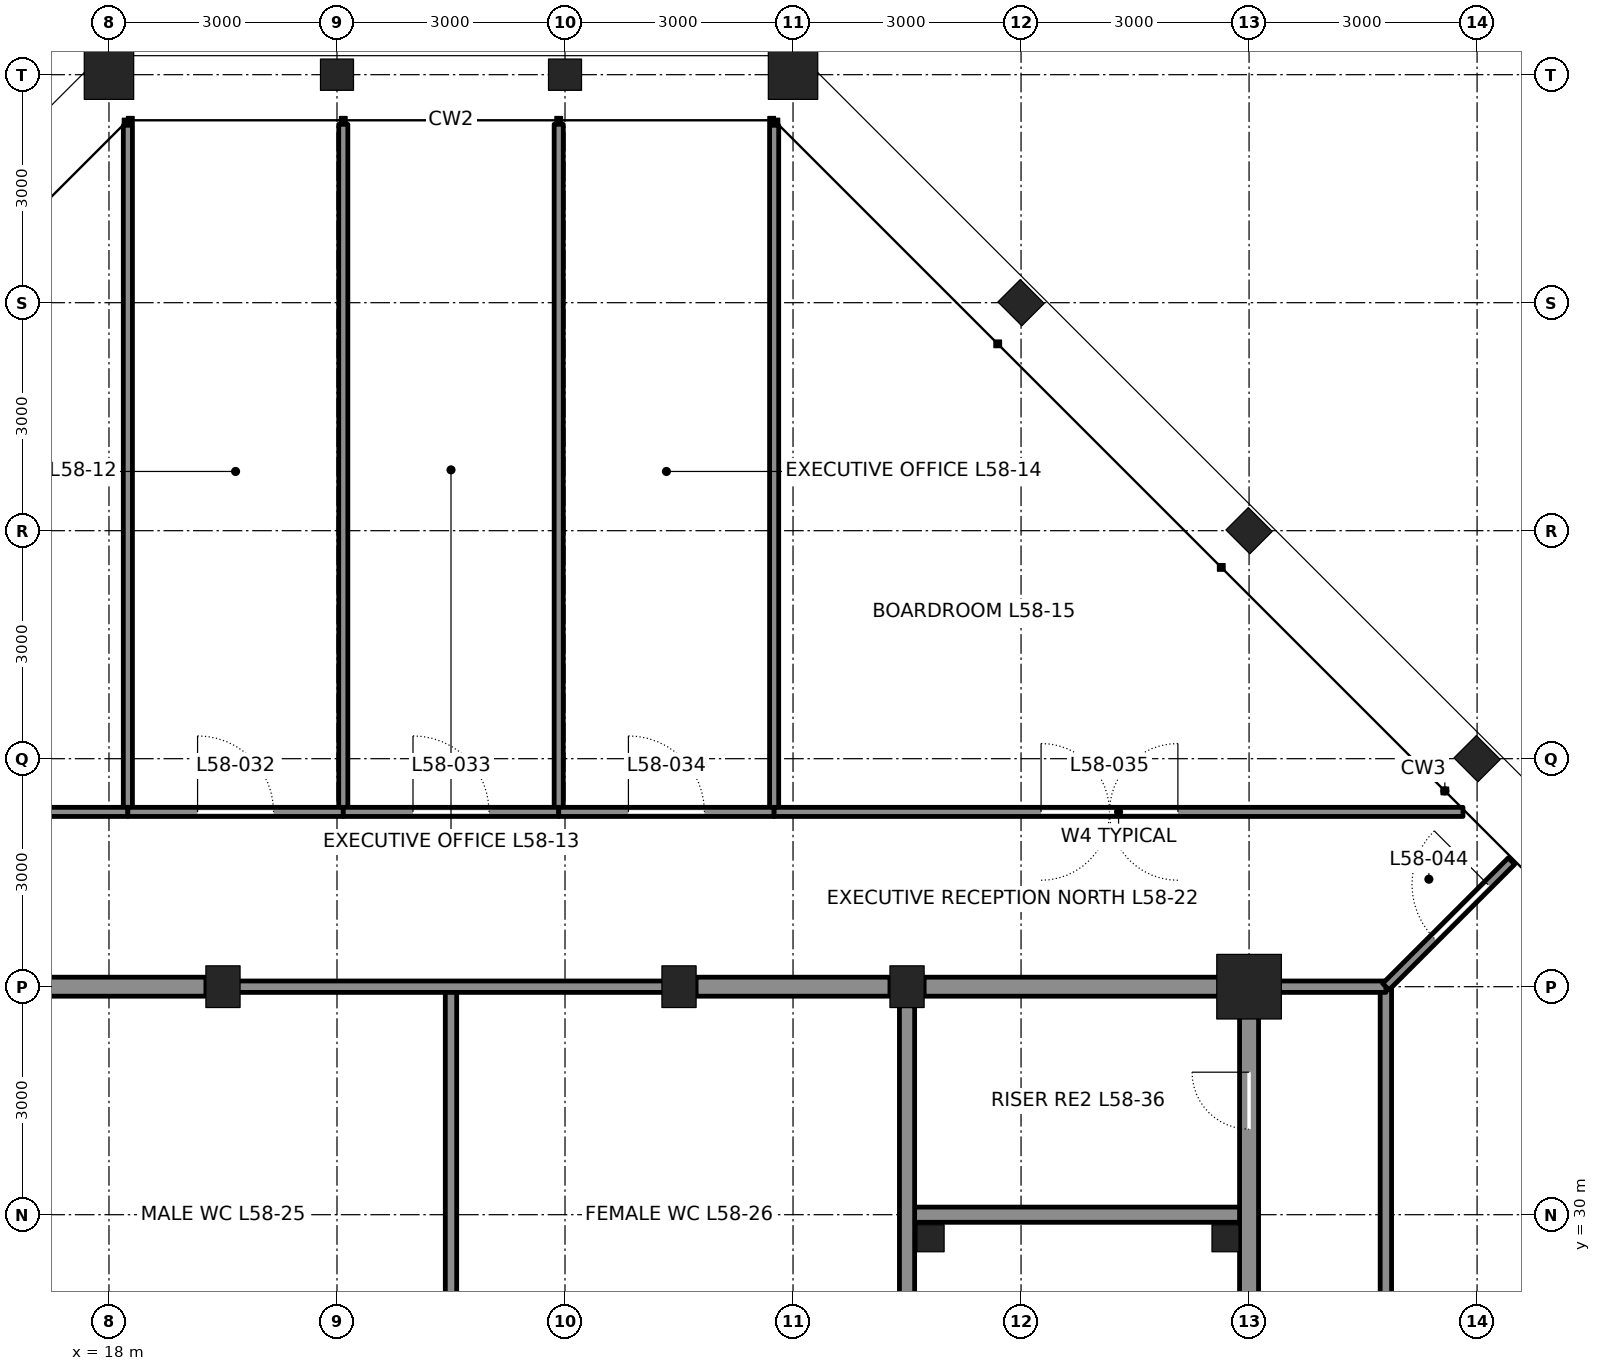
"""IFC4 building model, lengths in metres.
Left out: names, types, materials, properties, quantities, classifications, styles, units other than length and angle.
Written with IfcOpenShell. Run it as: python <this file> out.ifc"""

import sys

from ifc_helpers import new_model, si_unit, direction, frame, frame_2d, origin, origin_2d, place, context, subcontext, project, spatial, rectangle, hollow_rectangle, i_section, extrude, element, fill, save


model = new_model("IFC4")
c1 = context("Model", 3, precision=1e-05, world=origin(), true_north=direction((0.0, 1.0)))
c2 = subcontext(c1, "Body", "Model", "MODEL_VIEW")
j1 = project(units=[si_unit("LENGTHUNIT", "METRE"), si_unit("PLANEANGLEUNIT", "RADIAN")], contexts=[c1])
p1 = place(None, origin())
s1 = spatial("IfcSite", under=j1, at=p1, CompositionType="ELEMENT")
p2 = place(p1, origin())
s2 = spatial("IfcBuilding", under=s1, at=p2, CompositionType="ELEMENT")
p3 = place(p2, frame((0.0, 0.0, 262.2)))
s3 = spatial("IfcBuildingStorey", under=s2, at=p3, CompositionType="ELEMENT", Elevation=262.2)
for number, where, z_axis, x_axis in (
    (1, (36.0, 36.0, 0.0), (0.0, 0.0, 1.0), (0.707, 0.707, 0.0)),
    (2, (33.0, 39.0, 0.0), (0.0, 0.0, 1.0), (0.707, 0.707, 0.0)),
    (3, (30.0, 42.0, 0.0), (0.0, 0.0, 1.0), (0.707, 0.707, 0.0)),
):
    element("IfcColumn", number, at=place(p3, frame(where, z_axis=z_axis, x_axis=x_axis)), inside=s3, PredefinedType="COLUMN", context=c2, shape_type="SweptSolid", body=[
        extrude(i_section(OverallWidth=0.417, OverallDepth=0.445, WebThickness=0.039, FlangeThickness=0.063, at=origin_2d()), origin(), (0.0, 0.0, 1.0), 4.2),
    ])
p4 = place(p3, frame((27.0, 45.0, 0.0), z_axis=(0.0, 0.0, 1.0), x_axis=(0.0, 1.0, 0.0)))
e4 = element("IfcColumn", 4, at=p4, inside=s3, PredefinedType="COLUMN", context=c2, shape_type="SweptSolid", body=[
    extrude(hollow_rectangle(XDim=0.65, YDim=0.65, WallThickness=0.065, at=origin_2d()), origin(), (0.0, 0.0, 1.0), 4.2),
])
for number, where, z_axis, x_axis in (
    (5, (24.0, 45.0, 0.0), (0.0, 0.0, 1.0), (0.0, 1.0, 0.0)),
    (6, (21.0, 45.0, 0.0), (0.0, 0.0, 1.0), (0.0, 1.0, 0.0)),
):
    element("IfcColumn", number, at=place(p3, frame(where, z_axis=z_axis, x_axis=x_axis)), inside=s3, PredefinedType="COLUMN", context=c2, shape_type="SweptSolid", body=[
        extrude(i_section(OverallWidth=0.411, OverallDepth=0.434, WebThickness=0.036, FlangeThickness=0.057, at=origin_2d()), origin(), (0.0, 0.0, 1.0), 4.2),
    ])
p5 = place(p3, frame((18.0, 45.0, 0.0), z_axis=(0.0, 0.0, 1.0), x_axis=(0.0, 1.0, 0.0)))
e7 = element("IfcColumn", 7, at=p5, inside=s3, PredefinedType="COLUMN", context=c2, shape_type="SweptSolid", body=[
    extrude(hollow_rectangle(XDim=0.65, YDim=0.65, WallThickness=0.065, at=origin_2d()), origin(), (0.0, 0.0, 1.0), 4.2),
])
for number, where, z_axis, x_axis in (
    (8, (19.5, 33.0, 0.0), (0.0, 0.0, 1.0), (1.0, 0.0, 0.0)),
    (9, (25.5, 33.0, 0.0), (0.0, 0.0, 1.0), (1.0, 0.0, 0.0)),
    (10, (28.5, 33.0, 0.0), (0.0, 0.0, 1.0), (1.0, 0.0, 0.0)),
):
    element("IfcColumn", number, at=place(p3, frame(where, z_axis=z_axis, x_axis=x_axis)), inside=s3, PredefinedType="COLUMN", context=c2, shape_type="SweptSolid", body=[
        extrude(i_section(OverallWidth=0.449, OverallDepth=0.549, WebThickness=0.072, FlangeThickness=0.115, at=origin_2d()), origin(), (0.0, 0.0, 1.0), 4.2),
    ])
p6 = place(p3, frame((33.0, 33.0, 0.0), z_axis=(0.0, 0.0, 1.0), x_axis=(1.0, 0.0, 0.0)))
e11 = element("IfcColumn", 11, at=p6, inside=s3, PredefinedType="COLUMN", context=c2, shape_type="SweptSolid", body=[
    extrude(hollow_rectangle(XDim=0.85, YDim=0.85, WallThickness=0.085, at=origin_2d()), origin(), (0.0, 0.0, 1.0), 4.2),
])
p7 = place(p3, frame((28.5, 30.0, 0.0), z_axis=(0.0, 0.0, 1.0), x_axis=(1.0, 0.0, 0.0)))
e12 = element("IfcWall", 12, at=p7, inside=s3, PredefinedType="SOLIDWALL", context=c2, shape_type="SweptSolid", body=[
    extrude(rectangle(XDim=4.5, YDim=0.2, at=frame_2d((2.25, 0.0))), origin(), (0.0, 0.0, 1.0), 4.04),
])
for number, where, z_axis, x_axis in (
    (13, (16.725, 33.0, 0.0), (0.0, 0.0, 1.0), (1.0, 0.0, 0.0)),
    (14, (25.725, 33.0, 0.0), (0.0, 0.0, 1.0), (1.0, 0.0, 0.0)),
):
    element("IfcWall", number, at=place(p3, frame(where, z_axis=z_axis, x_axis=x_axis)), inside=s3, PredefinedType="SOLIDWALL", context=c2, shape_type="SweptSolid", body=[
        extrude(rectangle(XDim=2.55, YDim=0.25, at=frame_2d((1.275, 0.0))), origin(), (0.0, 0.0, 1.0), 3.182),
    ])
p8 = place(p3, frame((28.725, 33.0, 0.0), z_axis=(0.0, 0.0, 1.0), x_axis=(1.0, 0.0, 0.0)))
e15 = element("IfcWall", 15, at=p8, inside=s3, PredefinedType="SOLIDWALL", context=c2, shape_type="SweptSolid", body=[
    extrude(rectangle(XDim=4.025, YDim=0.25, at=frame_2d((2.013, 0.0))), origin(), (0.0, 0.0, 1.0), 3.182),
])
p9 = place(p3, frame((28.5, 24.25, 0.0), z_axis=(0.0, 0.0, 1.0), x_axis=(0.0, 1.0, 0.0)))
e16 = element("IfcWall", 16, at=p9, inside=s3, PredefinedType="SOLIDWALL", context=c2, shape_type="SweptSolid", body=[
    extrude(rectangle(XDim=8.5, YDim=0.2, at=frame_2d((4.25, 0.0))), origin(), (0.0, 0.0, 1.0), 3.113),
])
p10 = place(p3, frame((33.0, 24.25, 0.0), z_axis=(0.0, 0.0, 1.0), x_axis=(0.0, 1.0, 0.0)))
e17 = element("IfcWall", 17, at=p10, inside=s3, PredefinedType="SOLIDWALL", context=c2, shape_type="SweptSolid", body=[
    extrude(rectangle(XDim=8.5, YDim=0.25, at=frame_2d((4.25, 0.0))), origin(), (0.0, 0.0, 1.0), 3.113),
])
p11 = place(p10, frame((6.875, 0.0, 0.0)))
e18 = element("IfcOpeningElement", 18, at=p11, cuts=e17, PredefinedType="OPENING", context=c2, shape_type="SweptSolid", body=[
    extrude(rectangle(XDim=0.75, YDim=2.1, at=frame_2d((0.375, 1.05))), frame((0.0, 0.135, 0.0), z_axis=(0.0, -1.0, 0.0), x_axis=(1.0, 0.0, 0.0)), (0.0, 0.0, 1.0), 0.27),
])
p12 = place(p3, frame((22.5, 27.0, 0.0), z_axis=(0.0, 0.0, 1.0), x_axis=(0.0, 1.0, 0.0)))
e19 = element("IfcWall", 19, at=p12, inside=s3, PredefinedType="PARTITIONING", context=c2, shape_type="SweptSolid", body=[
    extrude(rectangle(XDim=6.0, YDim=0.15, at=frame_2d((3.0, 0.0))), origin(), (0.0, 0.0, 1.0), 4.04),
])
p13 = place(p3, frame((19.5, 33.0, 0.0), z_axis=(0.0, 0.0, 1.0), x_axis=(1.0, 0.0, 0.0)))
e20 = element("IfcWall", 20, at=p13, inside=s3, PredefinedType="PARTITIONING", context=c2, shape_type="SweptSolid", body=[
    extrude(rectangle(XDim=6.0, YDim=0.15, at=frame_2d((3.0, 0.0))), origin(), (0.0, 0.0, 1.0), 3.182),
])
p14 = place(p3, frame((18.249, 44.334, 0.0), z_axis=(0.0, 0.0, 1.0), x_axis=(0.0, -1.0, 0.0)))
e21 = element("IfcWall", 21, at=p14, inside=s3, PredefinedType="PARTITIONING", context=c2, shape_type="SweptSolid", body=[
    extrude(rectangle(XDim=9.034, YDim=0.12, at=frame_2d((4.517, 0.0))), origin(), (0.0, 0.0, 1.0), 4.04),
])
for number, where, z_axis, x_axis in (
    (22, (21.083, 44.347, 0.0), (0.0, 0.0, 1.0), (0.0, -1.0, 0.0)),
    (23, (23.917, 44.347, 0.0), (0.0, 0.0, 1.0), (0.0, -1.0, 0.0)),
):
    element("IfcWall", number, at=place(p3, frame(where, z_axis=z_axis, x_axis=x_axis)), inside=s3, PredefinedType="PARTITIONING", context=c2, shape_type="SweptSolid", body=[
        extrude(rectangle(XDim=9.047, YDim=0.12, at=frame_2d((4.524, 0.0))), origin(), (0.0, 0.0, 1.0), 3.357),
    ])
p15 = place(p3, frame((26.751, 44.334, 0.0), z_axis=(0.0, 0.0, 1.0), x_axis=(0.0, -1.0, 0.0)))
e24 = element("IfcWall", 24, at=p15, inside=s3, PredefinedType="PARTITIONING", context=c2, shape_type="SweptSolid", body=[
    extrude(rectangle(XDim=9.034, YDim=0.12, at=frame_2d((4.517, 0.0))), origin(), (0.0, 0.0, 1.0), 4.04),
])
p16 = place(p3, frame((9.186, 35.3, 0.0), z_axis=(0.0, 0.0, 1.0), x_axis=(1.0, 0.0, 0.0)))
e25 = element("IfcWall", 25, at=p16, inside=s3, PredefinedType="PARTITIONING", context=c2, shape_type="SweptSolid", body=[
    extrude(rectangle(XDim=9.063, YDim=0.12, at=frame_2d((4.531, 0.0))), origin(), (0.0, 0.0, 1.0), 4.04),
])
p17 = place(p16, frame((3.512, 0.0, 0.0)))
e26 = element("IfcOpeningElement", 26, at=p17, cuts=e25, PredefinedType="OPENING", context=c2, shape_type="SweptSolid", body=[
    extrude(rectangle(XDim=1.8, YDim=2.4, at=frame_2d((0.9, 1.2))), frame((0.0, 0.07, 0.0), z_axis=(0.0, -1.0, 0.0), x_axis=(1.0, 0.0, 0.0)), (0.0, 0.0, 1.0), 0.14),
])
p18 = place(p3, frame((18.249, 35.3, 0.0), z_axis=(0.0, 0.0, 1.0), x_axis=(1.0, 0.0, 0.0)))
e27 = element("IfcWall", 27, at=p18, inside=s3, PredefinedType="PARTITIONING", context=c2, shape_type="SweptSolid", body=[
    extrude(rectangle(XDim=2.834, YDim=0.12, at=frame_2d((1.417, 0.0))), origin(), (0.0, 0.0, 1.0), 4.04),
])
p19 = place(p18, frame((0.917, 0.0, 0.0)))
e28 = element("IfcOpeningElement", 28, at=p19, cuts=e27, PredefinedType="OPENING", context=c2, shape_type="SweptSolid", body=[
    extrude(rectangle(XDim=1.0, YDim=2.4, at=frame_2d((0.5, 1.2))), frame((0.0, 0.07, 0.0), z_axis=(0.0, -1.0, 0.0), x_axis=(1.0, 0.0, 0.0)), (0.0, 0.0, 1.0), 0.14),
])
p20 = place(p3, frame((21.083, 35.3, 0.0), z_axis=(0.0, 0.0, 1.0), x_axis=(1.0, 0.0, 0.0)))
e29 = element("IfcWall", 29, at=p20, inside=s3, PredefinedType="PARTITIONING", context=c2, shape_type="SweptSolid", body=[
    extrude(rectangle(XDim=2.834, YDim=0.12, at=frame_2d((1.417, 0.0))), origin(), (0.0, 0.0, 1.0), 4.04),
])
p21 = place(p20, frame((0.917, 0.0, 0.0)))
e30 = element("IfcOpeningElement", 30, at=p21, cuts=e29, PredefinedType="OPENING", context=c2, shape_type="SweptSolid", body=[
    extrude(rectangle(XDim=1.0, YDim=2.4, at=frame_2d((0.5, 1.2))), frame((0.0, 0.07, 0.0), z_axis=(0.0, -1.0, 0.0), x_axis=(1.0, 0.0, 0.0)), (0.0, 0.0, 1.0), 0.14),
])
p22 = place(p3, frame((23.917, 35.3, 0.0), z_axis=(0.0, 0.0, 1.0), x_axis=(1.0, 0.0, 0.0)))
e31 = element("IfcWall", 31, at=p22, inside=s3, PredefinedType="PARTITIONING", context=c2, shape_type="SweptSolid", body=[
    extrude(rectangle(XDim=2.834, YDim=0.12, at=frame_2d((1.417, 0.0))), origin(), (0.0, 0.0, 1.0), 4.04),
])
p23 = place(p22, frame((0.917, 0.0, 0.0)))
e32 = element("IfcOpeningElement", 32, at=p23, cuts=e31, PredefinedType="OPENING", context=c2, shape_type="SweptSolid", body=[
    extrude(rectangle(XDim=1.0, YDim=2.4, at=frame_2d((0.5, 1.2))), frame((0.0, 0.07, 0.0), z_axis=(0.0, -1.0, 0.0), x_axis=(1.0, 0.0, 0.0)), (0.0, 0.0, 1.0), 0.14),
])
p24 = place(p3, frame((26.751, 35.3, 0.0), z_axis=(0.0, 0.0, 1.0), x_axis=(1.0, 0.0, 0.0)))
e33 = element("IfcWall", 33, at=p24, inside=s3, PredefinedType="PARTITIONING", context=c2, shape_type="SweptSolid", body=[
    extrude(rectangle(XDim=9.063, YDim=0.12, at=frame_2d((4.531, 0.0))), origin(), (0.0, 0.0, 1.0), 4.04),
])
p25 = place(p24, frame((3.512, 0.0, 0.0)))
e34 = element("IfcOpeningElement", 34, at=p25, cuts=e33, PredefinedType="OPENING", context=c2, shape_type="SweptSolid", body=[
    extrude(rectangle(XDim=1.8, YDim=2.4, at=frame_2d((0.9, 1.2))), frame((0.0, 0.07, 0.0), z_axis=(0.0, -1.0, 0.0), x_axis=(1.0, 0.0, 0.0)), (0.0, 0.0, 1.0), 0.14),
])
p26 = place(p3, frame((34.8, 8.686, 0.0), z_axis=(0.0, 0.0, 1.0), x_axis=(0.0, 1.0, 0.0)))
e35 = element("IfcWall", 35, at=p26, inside=s3, PredefinedType="PARTITIONING", context=c2, shape_type="SweptSolid", body=[
    extrude(rectangle(XDim=24.314, YDim=0.15, at=frame_2d((12.157, 0.0))), origin(), (0.0, 0.0, 1.0), 4.04),
])
p27 = place(p26, frame((11.5, 0.0, 0.0)))
e36 = element("IfcOpeningElement", 36, at=p27, cuts=e35, PredefinedType="OPENING", context=c2, shape_type="SweptSolid", body=[
    extrude(rectangle(XDim=1.0, YDim=2.4, at=frame_2d((0.5, 1.2))), frame((0.0, 0.085, 0.0), z_axis=(0.0, -1.0, 0.0), x_axis=(1.0, 0.0, 0.0)), (0.0, 0.0, 1.0), 0.17),
])
p28 = place(p3, frame((33.0, 33.0, 0.0), z_axis=(0.0, 0.0, 1.0), x_axis=(1.0, 0.0, 0.0)))
e37 = element("IfcWall", 37, at=p28, inside=s3, PredefinedType="PARTITIONING", context=c2, shape_type="SweptSolid", body=[
    extrude(rectangle(XDim=1.8, YDim=0.15, at=frame_2d((0.9, 0.0))), origin(), (0.0, 0.0, 1.0), 3.271),
])
p29 = place(p3, frame((34.8, 33.0, 0.0), z_axis=(0.0, 0.0, 1.0), x_axis=(0.707106781187, 0.707106781187, 0.0)))
e38 = element("IfcWall", 38, at=p29, inside=s3, PredefinedType="PARTITIONING", context=c2, shape_type="SweptSolid", body=[
    extrude(rectangle(XDim=2.338, YDim=0.12, at=frame_2d((1.169, 0.0))), origin(), (0.0, 0.0, 1.0), 4.04),
])
p30 = place(p29, frame((0.9, 0.0, 0.0)))
e39 = element("IfcOpeningElement", 39, at=p30, cuts=e38, PredefinedType="OPENING", context=c2, shape_type="SweptSolid", body=[
    extrude(rectangle(XDim=1.0, YDim=2.4, at=frame_2d((0.5, 1.2))), frame((0.0, 0.07, 0.0), z_axis=(0.0, -1.0, 0.0), x_axis=(1.0, 0.0, 0.0)), (0.0, 0.0, 1.0), 0.14),
])
for number, where, z_axis, x_axis in (
    (40, (28.81, 29.69, 0.0), (0.0, 0.0, 1.0), (1.0, 0.0, 0.0)),
    (41, (32.69, 29.69, 0.0), (0.0, 0.0, 1.0), (1.0, 0.0, 0.0)),
):
    element("IfcColumn", number, at=place(p3, frame(where, z_axis=z_axis, x_axis=x_axis)), inside=s3, PredefinedType="COLUMN", context=c2, shape_type="SweptSolid", body=[
        extrude(hollow_rectangle(XDim=0.356, YDim=0.356, WallThickness=0.009, at=origin_2d()), origin(), (0.0, 0.0, 1.0), 4.2),
    ])
p31 = place(p11, origin())
e42 = element("IfcDoor", 42, at=p31, inside=s3, OperationType="SINGLE_SWING_RIGHT", PredefinedType="DOOR", context=c2, shape_type="SweptSolid", body=[
    extrude(rectangle(XDim=0.75, YDim=2.1, at=frame_2d((0.375, 1.05))), frame((0.0, 0.025, 0.0), z_axis=(0.0, -1.0, 0.0), x_axis=(1.0, 0.0, 0.0)), (0.0, 0.0, 1.0), 0.05),
])
fill(e18, e42)
p32 = place(p19, origin())
e43 = element("IfcDoor", 43, at=p32, inside=s3, OperationType="SINGLE_SWING_LEFT", PredefinedType="DOOR", context=c2, shape_type="SweptSolid", body=[
    extrude(rectangle(XDim=1.0, YDim=2.4, at=frame_2d((0.5, 1.2))), frame((0.0, 0.025, 0.0), z_axis=(0.0, -1.0, 0.0), x_axis=(1.0, 0.0, 0.0)), (0.0, 0.0, 1.0), 0.05),
])
fill(e28, e43)
p33 = place(p21, origin())
e44 = element("IfcDoor", 44, at=p33, inside=s3, OperationType="SINGLE_SWING_LEFT", PredefinedType="DOOR", context=c2, shape_type="SweptSolid", body=[
    extrude(rectangle(XDim=1.0, YDim=2.4, at=frame_2d((0.5, 1.2))), frame((0.0, 0.025, 0.0), z_axis=(0.0, -1.0, 0.0), x_axis=(1.0, 0.0, 0.0)), (0.0, 0.0, 1.0), 0.05),
])
fill(e30, e44)
p34 = place(p23, origin())
e45 = element("IfcDoor", 45, at=p34, inside=s3, OperationType="SINGLE_SWING_LEFT", PredefinedType="DOOR", context=c2, shape_type="SweptSolid", body=[
    extrude(rectangle(XDim=1.0, YDim=2.4, at=frame_2d((0.5, 1.2))), frame((0.0, 0.025, 0.0), z_axis=(0.0, -1.0, 0.0), x_axis=(1.0, 0.0, 0.0)), (0.0, 0.0, 1.0), 0.05),
])
fill(e32, e45)
p35 = place(p25, origin())
e46 = element("IfcDoor", 46, at=p35, inside=s3, OperationType="DOUBLE_DOOR_DOUBLE_SWING", PredefinedType="DOOR", context=c2, shape_type="SweptSolid", body=[
    extrude(rectangle(XDim=1.8, YDim=2.4, at=frame_2d((0.9, 1.2))), frame((0.0, 0.025, 0.0), z_axis=(0.0, -1.0, 0.0), x_axis=(1.0, 0.0, 0.0)), (0.0, 0.0, 1.0), 0.05),
])
fill(e34, e46)
p36 = place(p30, origin())
e47 = element("IfcDoor", 47, at=p36, inside=s3, OperationType="SINGLE_SWING_RIGHT", PredefinedType="DOOR", context=c2, shape_type="SweptSolid", body=[
    extrude(rectangle(XDim=1.0, YDim=2.4, at=frame_2d((0.5, 1.2))), frame((0.0, 0.025, 0.0), z_axis=(0.0, -1.0, 0.0), x_axis=(1.0, 0.0, 0.0)), (0.0, 0.0, 1.0), 0.05),
])
fill(e39, e47)
save(model, sys.argv[1])
